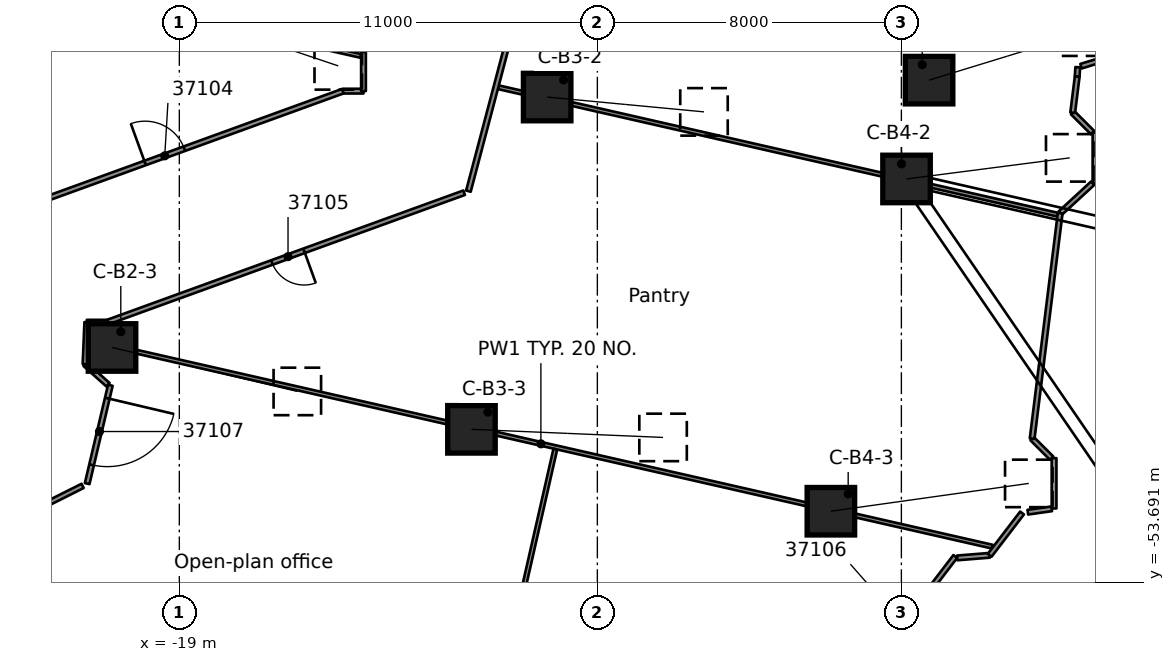
"""IFC4 building model, lengths in metres.
Left out: names, types, materials, properties, quantities, classifications, styles, units other than length and angle.
Written with IfcOpenShell. Run it as: python <this file> out.ifc"""

import sys

from ifc_helpers import new_model, si_unit, direction, frame, frame_2d, origin, origin_2d, place, context, subcontext, project, spatial, rectangle, extrude, element, fill, save


model = new_model("IFC4")
c1 = context("Model", 3, precision=1e-05, world=origin(), true_north=direction((0.0, 1.0)))
c2 = subcontext(c1, "Body", "Model", "MODEL_VIEW")
j1 = project(units=[si_unit("LENGTHUNIT", "METRE"), si_unit("PLANEANGLEUNIT", "RADIAN")], contexts=[c1])
p1 = place(None, origin())
s1 = spatial("IfcSite", under=j1, at=p1, CompositionType="ELEMENT")
p2 = place(p1, origin())
s2 = spatial("IfcBuilding", under=s1, at=p2, CompositionType="ELEMENT")
p3 = place(p2, frame((0.0, 0.0, 184.6)))
s3 = spatial("IfcBuildingStorey", under=s2, at=p3, CompositionType="ELEMENT", Elevation=184.6)
p4 = place(p3, frame((-18.779, -38.764, 0.509), z_axis=(0.771431629349, -0.259806608898, 0.58085606411), x_axis=(0.319170273664, 0.947697386516, 0.0)))
e1 = element("IfcColumn", 1, at=p4, inside=s3, PredefinedType="COLUMN", context=c2, shape_type="SweptSolid", body=[
    extrude(rectangle(XDim=1.25, YDim=1.25, at=origin_2d()), origin(), (0.0, 0.0, 1.0), 5.135),
])
p5 = place(p3, frame((-20.771, -47.507, 0.54), z_axis=(0.840671553318, -0.199476391507, 0.503468478331), x_axis=(0.230871820533, 0.97298417381, 0.0)))
e2 = element("IfcColumn", 2, at=p5, inside=s3, PredefinedType="COLUMN", context=c2, shape_type="SweptSolid", body=[
    extrude(rectangle(XDim=1.25, YDim=1.25, at=origin_2d()), origin(), (0.0, 0.0, 1.0), 5.8),
])
p6 = place(p3, frame((-9.321, -40.918, 0.507), z_axis=(0.807822667818, -0.076366577329, 0.584457597457), x_axis=(0.094114240656, 0.995561404287, 0.0)))
e3 = element("IfcColumn", 3, at=p6, inside=s3, PredefinedType="COLUMN", context=c2, shape_type="SweptSolid", body=[
    extrude(rectangle(XDim=1.25, YDim=1.25, at=origin_2d()), origin(), (0.0, 0.0, 1.0), 5.109),
])
p7 = place(p3, frame((-11.313, -49.661, 0.541), z_axis=(0.864946051901, -0.036562943217, 0.500531196314), x_axis=(0.042234217254, 0.99910773738, 0.0)))
e4 = element("IfcColumn", 4, at=p7, inside=s3, PredefinedType="COLUMN", context=c2, shape_type="SweptSolid", body=[
    extrude(rectangle(XDim=1.25, YDim=1.25, at=origin_2d()), origin(), (0.0, 0.0, 1.0), 5.829),
])
p8 = place(p3, frame((0.136, -43.073, 0.515), z_axis=(0.817897439629, 0.105701664787, 0.565571336182), x_axis=(-0.128169933962, 0.991752221086, 0.0)))
e5 = element("IfcColumn", 5, at=p8, inside=s3, PredefinedType="COLUMN", context=c2, shape_type="SweptSolid", body=[
    extrude(rectangle(XDim=1.25, YDim=1.25, at=origin_2d()), origin(), (0.0, 0.0, 1.0), 5.25),
])
p9 = place(p3, frame((-1.855, -51.816, 0.547), z_axis=(0.866750926043, 0.121813204401, 0.483636615071), x_axis=(-0.139172323167, 0.990268178053, 0.0)))
e6 = element("IfcColumn", 6, at=p9, inside=s3, PredefinedType="COLUMN", context=c2, shape_type="SweptSolid", body=[
    extrude(rectangle(XDim=1.25, YDim=1.25, at=origin_2d()), origin(), (0.0, 0.0, 1.0), 6.009),
])
p10 = place(p3, frame((0.729, -40.473, 0.514), z_axis=(0.786936095583, 0.241218803182, 0.567930515522), x_axis=(-0.293069723589, 0.956091071559, 0.0)))
e7 = element("IfcColumn", 7, at=p10, inside=s3, PredefinedType="COLUMN", context=c2, shape_type="SweptSolid", body=[
    extrude(rectangle(XDim=1.25, YDim=1.25, at=origin_2d()), origin(), (0.0, 0.0, 1.0), 5.232),
])
p11 = place(p3, frame((1.469, -53.044, 0.0), z_axis=(0.0, 0.0, 1.0), x_axis=(0.996856824523, 0.079224184453, 0.0)))
e8 = element("IfcWall", 8, at=p11, inside=s3, PredefinedType="PARTITIONING", context=c2, shape_type="SweptSolid", body=[
    extrude(rectangle(XDim=0.857, YDim=0.125, at=frame_2d((0.428, 0.0))), origin(), (0.0, 0.0, 1.0), 3.56),
])
p12 = place(p3, frame((-21.481, -47.948, 0.0), z_axis=(0.0, 0.0, 1.0), x_axis=(0.745477690797, -0.666530578837, 0.0)))
e9 = element("IfcWall", 9, at=p12, inside=s3, PredefinedType="PARTITIONING", context=c2, shape_type="SweptSolid", body=[
    extrude(rectangle(XDim=0.81, YDim=0.125, at=frame_2d((0.405, 0.0))), origin(), (0.0, 0.0, 1.0), 3.56),
])
p13 = place(p3, frame((-21.364, -47.337, 0.0), z_axis=(0.0, 0.0, 1.0), x_axis=(0.975026141861, -0.222090122894, 0.0)))
e10 = element("IfcWall", 10, at=p13, inside=s3, PredefinedType="PARTITIONING", context=c2, shape_type="SweptSolid", body=[
    extrude(rectangle(XDim=24.365, YDim=0.1, at=frame_2d((12.182, 0.0))), origin(), (0.0, 0.0, 1.0), 3.56),
])
p14 = place(p3, frame((-29.073, -36.453, 0.0), z_axis=(0.0, 0.0, 1.0), x_axis=(0.975016001199, -0.222134638017, 0.0)))
e11 = element("IfcWall", 11, at=p14, inside=s3, PredefinedType="PARTITIONING", context=c2, shape_type="SweptSolid", body=[
    extrude(rectangle(XDim=15.225, YDim=0.1, at=frame_2d((7.613, 0.0))), origin(), (0.0, 0.0, 1.0), 3.56),
])
p15 = place(p3, frame((-10.605, -40.66, 0.0), z_axis=(0.0, 0.0, 1.0), x_axis=(0.975014665888, -0.222140499018, 0.0)))
e12 = element("IfcWall", 12, at=p15, inside=s3, PredefinedType="PARTITIONING", context=c2, shape_type="SweptSolid", body=[
    extrude(rectangle(XDim=15.094, YDim=0.1, at=frame_2d((7.547, 0.0))), origin(), (0.0, 0.0, 1.0), 3.56),
])
p16 = place(p3, frame((3.441, -49.907, 0.0), z_axis=(0.0, 0.0, 1.0), x_axis=(0.707946674324, -0.706265889247, 0.0)))
e13 = element("IfcWall", 13, at=p16, inside=s3, PredefinedType="PARTITIONING", context=c2, shape_type="SweptSolid", body=[
    extrude(rectangle(XDim=0.726, YDim=0.125, at=frame_2d((0.363, 0.0))), origin(), (0.0, 0.0, 1.0), 3.56),
])
p17 = place(p3, frame((-21.435, -46.842, 0.0), z_axis=(0.0, 0.0, 1.0), x_axis=(1.0, 0.0, 0.0)))
e14 = element("IfcWall", 14, at=p17, inside=s3, PredefinedType="PARTITIONING", context=c2, shape_type="SweptSolid", body=[
    extrude(rectangle(XDim=0.543, YDim=0.125, at=frame_2d((0.271, 0.0))), origin(), (0.0, 0.0, 1.0), 3.56),
])
p18 = place(p3, frame((4.508, -41.33, 0.0), z_axis=(0.0, 0.0, 1.0), x_axis=(0.707106781187, -0.707106781187, 0.0)))
e15 = element("IfcWall", 15, at=p18, inside=s3, PredefinedType="PARTITIONING", context=c2, shape_type="SweptSolid", body=[
    extrude(rectangle(XDim=0.741, YDim=0.125, at=frame_2d((0.371, 0.0))), origin(), (0.0, 0.0, 1.0), 3.56),
])
p19 = place(p3, frame((-14.697, -40.762, 0.0), z_axis=(0.0, 0.0, 1.0), x_axis=(1.0, 0.0, 0.0)))
e16 = element("IfcWall", 16, at=p19, inside=s3, PredefinedType="PARTITIONING", context=c2, shape_type="SweptSolid", body=[
    extrude(rectangle(XDim=0.543, YDim=0.125, at=frame_2d((0.271, 0.0))), origin(), (0.0, 0.0, 1.0), 3.56),
])
p20 = place(p3, frame((4.179, -43.973, 0.0), z_axis=(0.0, 0.0, 1.0), x_axis=(0.735423785208, 0.677607449893, 0.0)))
e17 = element("IfcWall", 17, at=p20, inside=s3, PredefinedType="PARTITIONING", context=c2, shape_type="SweptSolid", body=[
    extrude(rectangle(XDim=1.161, YDim=0.125, at=frame_2d((0.581, 0.0))), origin(), (0.0, 0.0, 1.0), 3.56),
])
p21 = place(p3, frame((3.327, -51.841, 0.0), z_axis=(0.0, 0.0, 1.0), x_axis=(0.990117840242, 0.140237878032, 0.0)))
e18 = element("IfcWall", 18, at=p21, inside=s3, PredefinedType="PARTITIONING", context=c2, shape_type="SweptSolid", body=[
    extrude(rectangle(XDim=0.635, YDim=0.125, at=frame_2d((0.318, 0.0))), origin(), (0.0, 0.0, 1.0), 3.56),
])
p22 = place(p3, frame((4.727, -40.106, 0.0), z_axis=(0.0, 0.0, 1.0), x_axis=(0.955857938903, 0.293829203171, 0.0)))
e19 = element("IfcWall", 19, at=p22, inside=s3, PredefinedType="PARTITIONING", context=c2, shape_type="SweptSolid", body=[
    extrude(rectangle(XDim=0.735, YDim=0.125, at=frame_2d((0.368, 0.0))), origin(), (0.0, 0.0, 1.0), 3.56),
])
p23 = place(p3, frame((-11.505, -43.435, 0.0), z_axis=(0.0, 0.0, 1.0), x_axis=(-0.940003814224, -0.341163933095, 0.0)))
e20 = element("IfcWall", 20, at=p23, inside=s3, PredefinedType="PARTITIONING", context=c2, shape_type="SweptSolid", body=[
    extrude(rectangle(XDim=9.986, YDim=0.125, at=frame_2d((4.993, 0.0))), origin(), (0.0, 0.0, 1.0), 3.56),
])
p24 = place(p23, frame((4.48, 0.0, 0.0)))
e21 = element("IfcOpeningElement", 21, at=p24, cuts=e20, PredefinedType="OPENING", context=c2, shape_type="SweptSolid", body=[
    extrude(rectangle(XDim=0.9, YDim=2.1, at=frame_2d((0.45, 1.05))), frame((0.0, 0.073, 0.0), z_axis=(0.0, -1.0, 0.0), x_axis=(1.0, 0.0, 0.0)), (0.0, 0.0, 1.0), 0.145),
])
p25 = place(p3, frame((-24.125, -44.186, 0.0), z_axis=(0.0, 0.0, 1.0), x_axis=(0.939961739334, 0.341279839118, 0.0)))
e22 = element("IfcWall", 22, at=p25, inside=s3, PredefinedType="PARTITIONING", context=c2, shape_type="SweptSolid", body=[
    extrude(rectangle(XDim=10.03, YDim=0.125, at=frame_2d((5.015, 0.0))), origin(), (0.0, 0.0, 1.0), 3.56),
])
p26 = place(p25, frame((4.494, 0.0, 0.0)))
e23 = element("IfcOpeningElement", 23, at=p26, cuts=e22, PredefinedType="OPENING", context=c2, shape_type="SweptSolid", body=[
    extrude(rectangle(XDim=1.1, YDim=2.1, at=frame_2d((0.55, 1.05))), frame((0.0, 0.073, 0.0), z_axis=(0.0, -1.0, 0.0), x_axis=(1.0, 0.0, 0.0)), (0.0, 0.0, 1.0), 0.145),
])
p27 = place(p3, frame((-24.532, -52.65, 0.0), z_axis=(0.0, 0.0, 1.0), x_axis=(0.89353443756, 0.448994664661, 0.0)))
e24 = element("IfcWall", 24, at=p27, inside=s3, PredefinedType="PARTITIONING", context=c2, shape_type="SweptSolid", body=[
    extrude(rectangle(XDim=3.343, YDim=0.125, at=frame_2d((1.671, 0.0))), origin(), (0.0, 0.0, 1.0), 3.56),
])
p28 = place(p3, frame((3.176, -51.862, 0.0), z_axis=(0.0, 0.0, 1.0), x_axis=(-0.607960208504, -0.793967496108, 0.0)))
e25 = element("IfcWall", 25, at=p28, inside=s3, PredefinedType="PARTITIONING", context=c2, shape_type="SweptSolid", body=[
    extrude(rectangle(XDim=1.403, YDim=0.125, at=frame_2d((0.702, 0.0))), origin(), (0.0, 0.0, 1.0), 3.56),
])
p29 = place(p3, frame((4.833, -55.621, 0.0), z_axis=(0.0, 0.0, 1.0), x_axis=(0.607810491172, 0.794082115918, 0.0)))
e26 = element("IfcWall", 26, at=p29, inside=s3, PredefinedType="PARTITIONING", context=c2, shape_type="SweptSolid", body=[
    extrude(rectangle(XDim=2.766, YDim=0.125, at=frame_2d((1.383, 0.0))), origin(), (0.0, 0.0, 1.0), 3.56),
])
p30 = place(p3, frame((-1.317, -56.58, 0.0), z_axis=(0.0, 0.0, 1.0), x_axis=(0.607810548227, 0.794082072247, 0.0)))
e27 = element("IfcWall", 27, at=p30, inside=s3, PredefinedType="PARTITIONING", context=c2, shape_type="SweptSolid", body=[
    extrude(rectangle(XDim=4.5, YDim=0.125, at=frame_2d((2.25, 0.0))), origin(), (0.0, 0.0, 1.0), 3.56),
])
p31 = place(p30, frame((1.35, 0.0, 0.0)))
e28 = element("IfcOpeningElement", 28, at=p31, cuts=e27, PredefinedType="OPENING", context=c2, shape_type="SweptSolid", body=[
    extrude(rectangle(XDim=1.8, YDim=2.1, at=frame_2d((0.9, 1.05))), frame((0.0, 0.073, 0.0), z_axis=(0.0, -1.0, 0.0), x_axis=(1.0, 0.0, 0.0)), (0.0, 0.0, 1.0), 0.145),
])
p32 = place(p3, frame((-8.315, -31.758, 0.0), z_axis=(0.0, 0.0, 1.0), x_axis=(-0.255738124707, -0.966746094676, 0.0)))
e29 = element("IfcWall", 29, at=p32, inside=s3, PredefinedType="PARTITIONING", context=c2, shape_type="SweptSolid", body=[
    extrude(rectangle(XDim=12.036, YDim=0.125, at=frame_2d((6.018, 0.0))), origin(), (0.0, 0.0, 1.0), 3.56),
])
p33 = place(p32, frame((3.788, 0.0, 0.0)))
e30 = element("IfcOpeningElement", 30, at=p33, cuts=e29, PredefinedType="OPENING", context=c2, shape_type="SweptSolid", body=[
    extrude(rectangle(XDim=1.8, YDim=2.1, at=frame_2d((0.9, 1.05))), frame((0.0, 0.073, 0.0), z_axis=(0.0, -1.0, 0.0), x_axis=(1.0, 0.0, 0.0)), (0.0, 0.0, 1.0), 0.145),
])
p34 = place(p3, frame((-20.815, -48.502, 0.0), z_axis=(0.0, 0.0, 1.0), x_axis=(-0.229525642511, -0.973302614519, 0.0)))
e31 = element("IfcWall", 31, at=p34, inside=s3, PredefinedType="PARTITIONING", context=c2, shape_type="SweptSolid", body=[
    extrude(rectangle(XDim=2.658, YDim=0.125, at=frame_2d((1.329, 0.0))), origin(), (0.0, 0.0, 1.0), 3.56),
])
p35 = place(p34, frame((0.35, 0.0, 0.0)))
e32 = element("IfcOpeningElement", 32, at=p35, cuts=e31, PredefinedType="OPENING", context=c2, shape_type="SweptSolid", body=[
    extrude(rectangle(XDim=1.8, YDim=2.1, at=frame_2d((0.9, 1.05))), frame((0.0, 0.073, 0.0), z_axis=(0.0, -1.0, 0.0), x_axis=(1.0, 0.0, 0.0)), (0.0, 0.0, 1.0), 0.145),
])
p36 = place(p3, frame((-21.481, -47.948, 0.0), z_axis=(0.0, 0.0, 1.0), x_axis=(0.041465410314, 0.999139940022, 0.0)))
e33 = element("IfcWall", 33, at=p36, inside=s3, PredefinedType="PARTITIONING", context=c2, shape_type="SweptSolid", body=[
    extrude(rectangle(XDim=1.107, YDim=0.125, at=frame_2d((0.553, 0.0))), origin(), (0.0, 0.0, 1.0), 3.56),
])
p37 = place(p3, frame((-11.283, -59.736, 0.0), z_axis=(0.0, 0.0, 1.0), x_axis=(0.222142221774, 0.975014273385, 0.0)))
e34 = element("IfcWall", 34, at=p37, inside=s3, PredefinedType="PARTITIONING", context=c2, shape_type="SweptSolid", body=[
    extrude(rectangle(XDim=9.8, YDim=0.1, at=frame_2d((4.9, 0.0))), origin(), (0.0, 0.0, 1.0), 3.56),
])
p38 = place(p3, frame((3.441, -49.907, 0.0), z_axis=(0.0, 0.0, 1.0), x_axis=(0.123421669621, 0.992354317504, 0.0)))
e35 = element("IfcWall", 35, at=p38, inside=s3, PredefinedType="PARTITIONING", context=c2, shape_type="SweptSolid", body=[
    extrude(rectangle(XDim=5.98, YDim=0.125, at=frame_2d((2.99, 0.0))), origin(), (0.0, 0.0, 1.0), 3.56),
])
p39 = place(p3, frame((4.508, -41.33, 0.0), z_axis=(0.0, 0.0, 1.0), x_axis=(0.123659703411, 0.992324683635, 0.0)))
e36 = element("IfcWall", 36, at=p39, inside=s3, PredefinedType="PARTITIONING", context=c2, shape_type="SweptSolid", body=[
    extrude(rectangle(XDim=0.961, YDim=0.125, at=frame_2d((0.481, 0.0))), origin(), (0.0, 0.0, 1.0), 3.56),
])
p40 = place(p3, frame((4.627, -40.376, 0.0), z_axis=(0.0, 0.0, 1.0), x_axis=(0.057960455479, 0.998318879718, 0.0)))
e37 = element("IfcWall", 37, at=p40, inside=s3, PredefinedType="PARTITIONING", context=c2, shape_type="SweptSolid", body=[
    extrude(rectangle(XDim=0.244, YDim=0.125, at=frame_2d((0.122, 0.0))), origin(), (0.0, 0.0, 1.0), 3.56),
])
p41 = place(p3, frame((5.095, -43.178, 0.0), z_axis=(0.0, 0.0, 1.0), x_axis=(0.0, 1.0, 0.0)))
e38 = element("IfcWall", 38, at=p41, inside=s3, PredefinedType="PARTITIONING", context=c2, shape_type="SweptSolid", body=[
    extrude(rectangle(XDim=1.324, YDim=0.125, at=frame_2d((0.662, 0.0))), origin(), (0.0, 0.0, 1.0), 3.56),
])
p42 = place(p3, frame((4.018, -51.743, 0.0), z_axis=(0.0, 0.0, 1.0), x_axis=(0.0, 1.0, 0.0)))
e39 = element("IfcWall", 39, at=p42, inside=s3, PredefinedType="PARTITIONING", context=c2, shape_type="SweptSolid", body=[
    extrude(rectangle(XDim=1.323, YDim=0.125, at=frame_2d((0.662, 0.0))), origin(), (0.0, 0.0, 1.0), 3.56),
])
p43 = place(p3, frame((-14.154, -40.762, 0.0), z_axis=(0.0, 0.0, 1.0), x_axis=(0.0, 1.0, 0.0)))
e40 = element("IfcWall", 40, at=p43, inside=s3, PredefinedType="PARTITIONING", context=c2, shape_type="SweptSolid", body=[
    extrude(rectangle(XDim=1.03, YDim=0.125, at=frame_2d((0.515, 0.0))), origin(), (0.0, 0.0, 1.0), 3.56),
])
p44 = place(p26, origin())
e41 = element("IfcDoor", 41, at=p44, inside=s3, OperationType="SINGLE_SWING_RIGHT", PredefinedType="DOOR", context=c2, shape_type="SweptSolid", body=[
    extrude(rectangle(XDim=1.1, YDim=2.1, at=frame_2d((0.55, 1.05))), frame((0.0, 0.025, 0.0), z_axis=(0.0, -1.0, 0.0), x_axis=(1.0, 0.0, 0.0)), (0.0, 0.0, 1.0), 0.05),
])
fill(e23, e41)
p45 = place(p24, origin())
e42 = element("IfcDoor", 42, at=p45, inside=s3, OperationType="SINGLE_SWING_LEFT", PredefinedType="DOOR", context=c2, shape_type="SweptSolid", body=[
    extrude(rectangle(XDim=0.9, YDim=2.1, at=frame_2d((0.45, 1.05))), frame((0.0, 0.025, 0.0), z_axis=(0.0, -1.0, 0.0), x_axis=(1.0, 0.0, 0.0)), (0.0, 0.0, 1.0), 0.05),
])
fill(e21, e42)
p46 = place(p35, origin())
e43 = element("IfcDoor", 43, at=p46, inside=s3, OperationType="DOUBLE_DOOR_SINGLE_SWING", PredefinedType="DOOR", context=c2, shape_type="SweptSolid", body=[
    extrude(rectangle(XDim=1.8, YDim=2.1, at=frame_2d((0.9, 1.05))), frame((0.0, 0.025, 0.0), z_axis=(0.0, -1.0, 0.0), x_axis=(1.0, 0.0, 0.0)), (0.0, 0.0, 1.0), 0.05),
])
fill(e32, e43)
save(model, sys.argv[1])
